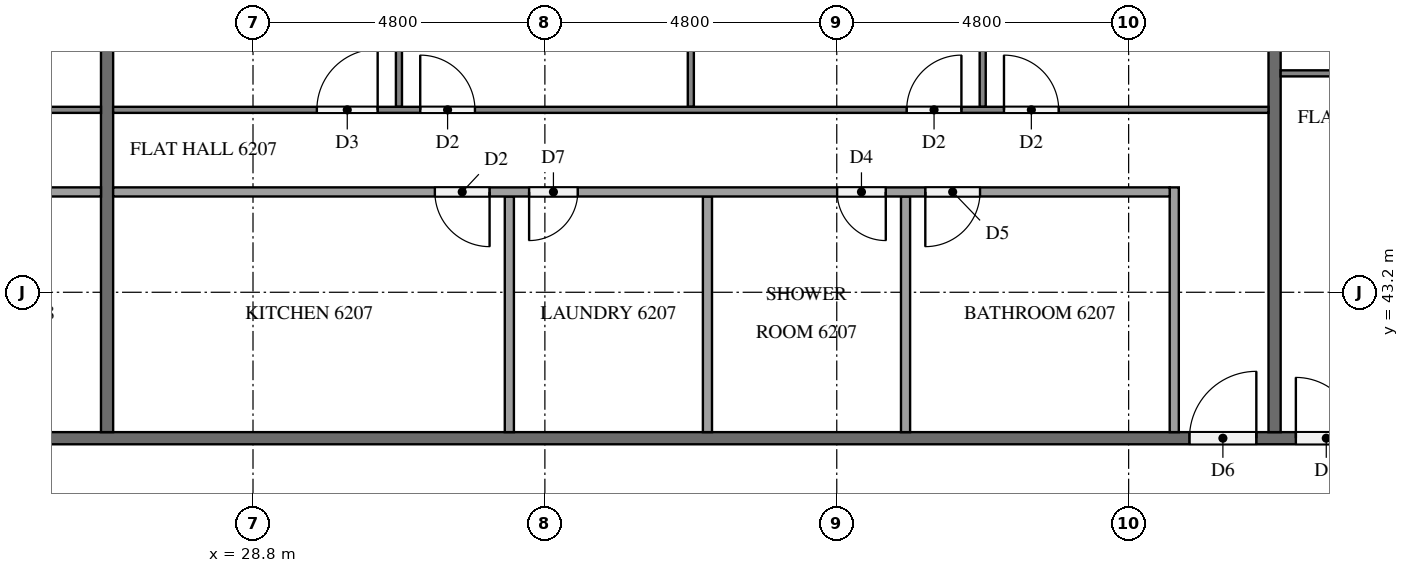
"""IFC4 building model, lengths in metres.
Left out: names, types, materials, properties, quantities, classifications, styles, units other than length and angle.
Written with IfcOpenShell. Run it as: python <this file> out.ifc"""

import sys

from ifc_helpers import new_model, si_unit, direction, frame, frame_2d, origin, place, context, subcontext, project, spatial, rectangle, extrude, element, fill, save


model = new_model("IFC4")
c1 = context("Model", 3, precision=1e-05, world=origin(), true_north=direction((0.0, 1.0)))
c2 = subcontext(c1, "Body", "Model", "MODEL_VIEW")
j1 = project(units=[si_unit("LENGTHUNIT", "METRE"), si_unit("PLANEANGLEUNIT", "RADIAN")], contexts=[c1])
p1 = place(None, origin())
s1 = spatial("IfcSite", under=j1, at=p1, CompositionType="ELEMENT")
p2 = place(p1, origin())
s2 = spatial("IfcBuilding", under=s1, at=p2, CompositionType="ELEMENT")
p3 = place(p2, frame((0.0, 0.0, 238.7)))
s3 = spatial("IfcBuildingStorey", under=s2, at=p3, CompositionType="ELEMENT", Elevation=238.7)
p4 = place(p3, frame((11.9, 40.8, 0.0), z_axis=(0.0, 0.0, 1.0), x_axis=(1.0, 0.0, 0.0)))
e1 = element("IfcWall", 1, at=p4, inside=s3, PredefinedType="PARTITIONING", context=c2, shape_type="SweptSolid", body=[
    extrude(rectangle(XDim=38.6, YDim=0.2, at=frame_2d((19.3, 0.0))), origin(), (0.0, 0.0, 1.0), 3.2),
])
p5 = place(p4, frame((34.05, 0.0, 0.0)))
e2 = element("IfcOpeningElement", 2, at=p5, cuts=e1, PredefinedType="OPENING", context=c2, shape_type="SweptSolid", body=[
    extrude(rectangle(XDim=1.0, YDim=2.1, at=frame_2d((0.5, 1.05))), frame((0.0, 0.11, 0.0), z_axis=(0.0, -1.0, 0.0), x_axis=(1.0, 0.0, 0.0)), (0.0, 0.0, 1.0), 0.22),
])
p6 = place(p4, frame((32.3, 0.0, 0.0)))
e3 = element("IfcOpeningElement", 3, at=p6, cuts=e1, PredefinedType="OPENING", context=c2, shape_type="SweptSolid", body=[
    extrude(rectangle(XDim=1.1, YDim=2.1, at=frame_2d((0.55, 1.05))), frame((0.0, 0.11, 0.0), z_axis=(0.0, -1.0, 0.0), x_axis=(1.0, 0.0, 0.0)), (0.0, 0.0, 1.0), 0.22),
])
p7 = place(p4, frame((2.85, 0.0, 0.0)))
e4 = element("IfcOpeningElement", 4, at=p7, cuts=e1, PredefinedType="OPENING", context=c2, shape_type="SweptSolid", body=[
    extrude(rectangle(XDim=1.0, YDim=2.1, at=frame_2d((0.5, 1.05))), frame((0.0, 0.11, 0.0), z_axis=(0.0, -1.0, 0.0), x_axis=(1.0, 0.0, 0.0)), (0.0, 0.0, 1.0), 0.22),
])
p8 = place(p4, frame((1.15, 0.0, 0.0)))
e5 = element("IfcOpeningElement", 5, at=p8, cuts=e1, PredefinedType="OPENING", context=c2, shape_type="SweptSolid", body=[
    extrude(rectangle(XDim=1.0, YDim=2.1, at=frame_2d((0.5, 1.05))), frame((0.0, 0.11, 0.0), z_axis=(0.0, -1.0, 0.0), x_axis=(1.0, 0.0, 0.0)), (0.0, 0.0, 1.0), 0.22),
])
for number, where, z_axis, x_axis in (
    (6, (45.6, 52.7, 0.0), (0.0, 0.0, 1.0), (0.0, -1.0, 0.0)),
    (7, (26.4, 52.7, 0.0), (0.0, 0.0, 1.0), (0.0, -1.0, 0.0)),
):
    element("IfcWall", number, at=place(p3, frame(where, z_axis=z_axis, x_axis=x_axis)), inside=s3, PredefinedType="PARTITIONING", context=c2, shape_type="SweptSolid", body=[
        extrude(rectangle(XDim=11.8, YDim=0.2, at=frame_2d((5.9, 0.0))), origin(), (0.0, 0.0, 1.0), 3.2),
    ])
p9 = place(p3, frame((45.7, 46.8, 0.0), z_axis=(0.0, 0.0, 1.0), x_axis=(1.0, 0.0, 0.0)))
e8 = element("IfcWall", 8, at=p9, inside=s3, PredefinedType="PARTITIONING", context=c2, shape_type="SweptSolid", body=[
    extrude(rectangle(XDim=11.8, YDim=0.1, at=frame_2d((5.9, 0.0))), origin(), (0.0, 0.0, 1.0), 3.2),
])
p10 = place(p9, frame((3.45, 0.0, 0.0)))
e9 = element("IfcOpeningElement", 9, at=p10, cuts=e8, PredefinedType="OPENING", context=c2, shape_type="SweptSolid", body=[
    extrude(rectangle(XDim=0.9, YDim=2.1, at=frame_2d((0.45, 1.05))), frame((0.0, 0.06, 0.0), z_axis=(0.0, -1.0, 0.0), x_axis=(1.0, 0.0, 0.0)), (0.0, 0.0, 1.0), 0.12),
])
p11 = place(p9, frame((5.05, 0.0, 0.0)))
e10 = element("IfcOpeningElement", 10, at=p11, cuts=e8, PredefinedType="OPENING", context=c2, shape_type="SweptSolid", body=[
    extrude(rectangle(XDim=1.0, YDim=2.1, at=frame_2d((0.5, 1.05))), frame((0.0, 0.06, 0.0), z_axis=(0.0, -1.0, 0.0), x_axis=(1.0, 0.0, 0.0)), (0.0, 0.0, 1.0), 0.12),
])
for number, where, z_axis, x_axis in (
    (11, (40.8, 46.25, 0.0), (0.0, 0.0, 1.0), (0.0, 1.0, 0.0)),
    (12, (36.0, 46.25, 0.0), (0.0, 0.0, 1.0), (0.0, 1.0, 0.0)),
    (13, (31.2, 46.25, 0.0), (0.0, 0.0, 1.0), (0.0, 1.0, 0.0)),
):
    element("IfcWall", number, at=place(p3, frame(where, z_axis=z_axis, x_axis=x_axis)), inside=s3, PredefinedType="PARTITIONING", context=c2, shape_type="SweptSolid", body=[
        extrude(rectangle(XDim=6.45, YDim=0.1, at=frame_2d((3.225, 0.0))), origin(), (0.0, 0.0, 1.0), 3.2),
    ])
p12 = place(p3, frame((26.5, 46.2, 0.0), z_axis=(0.0, 0.0, 1.0), x_axis=(1.0, 0.0, 0.0)))
e14 = element("IfcWall", 14, at=p12, inside=s3, PredefinedType="PARTITIONING", context=c2, shape_type="SweptSolid", body=[
    extrude(rectangle(XDim=19.0, YDim=0.1, at=frame_2d((9.5, 0.0))), origin(), (0.0, 0.0, 1.0), 3.2),
])
p13 = place(p12, frame((14.65, 0.0, 0.0)))
e15 = element("IfcOpeningElement", 15, at=p13, cuts=e14, PredefinedType="OPENING", context=c2, shape_type="SweptSolid", body=[
    extrude(rectangle(XDim=0.9, YDim=2.1, at=frame_2d((0.45, 1.05))), frame((0.0, 0.06, 0.0), z_axis=(0.0, -1.0, 0.0), x_axis=(1.0, 0.0, 0.0)), (0.0, 0.0, 1.0), 0.12),
])
p14 = place(p12, frame((13.05, 0.0, 0.0)))
e16 = element("IfcOpeningElement", 16, at=p14, cuts=e14, PredefinedType="OPENING", context=c2, shape_type="SweptSolid", body=[
    extrude(rectangle(XDim=0.9, YDim=2.1, at=frame_2d((0.45, 1.05))), frame((0.0, 0.06, 0.0), z_axis=(0.0, -1.0, 0.0), x_axis=(1.0, 0.0, 0.0)), (0.0, 0.0, 1.0), 0.12),
])
p15 = place(p12, frame((5.05, 0.0, 0.0)))
e17 = element("IfcOpeningElement", 17, at=p15, cuts=e14, PredefinedType="OPENING", context=c2, shape_type="SweptSolid", body=[
    extrude(rectangle(XDim=0.9, YDim=2.1, at=frame_2d((0.45, 1.05))), frame((0.0, 0.06, 0.0), z_axis=(0.0, -1.0, 0.0), x_axis=(1.0, 0.0, 0.0)), (0.0, 0.0, 1.0), 0.12),
])
p16 = place(p12, frame((3.35, 0.0, 0.0)))
e18 = element("IfcOpeningElement", 18, at=p16, cuts=e14, PredefinedType="OPENING", context=c2, shape_type="SweptSolid", body=[
    extrude(rectangle(XDim=1.0, YDim=2.1, at=frame_2d((0.5, 1.05))), frame((0.0, 0.06, 0.0), z_axis=(0.0, -1.0, 0.0), x_axis=(1.0, 0.0, 0.0)), (0.0, 0.0, 1.0), 0.12),
])
for number, where, z_axis, x_axis in (
    (19, (39.531, 40.9, 0.0), (0.0, 0.0, 1.0), (0.0, 1.0, 0.0)),
    (20, (36.273, 40.9, 0.0), (0.0, 0.0, 1.0), (0.0, 1.0, 0.0)),
    (21, (33.016, 40.9, 0.0), (0.0, 0.0, 1.0), (0.0, 1.0, 0.0)),
):
    element("IfcWall", number, at=place(p3, frame(where, z_axis=z_axis, x_axis=x_axis)), inside=s3, PredefinedType="PARTITIONING", context=c2, shape_type="SweptSolid", body=[
        extrude(rectangle(XDim=3.875, YDim=0.15, at=frame_2d((1.938, 0.0))), origin(), (0.0, 0.0, 1.0), 3.2),
    ])
p17 = place(p3, frame((43.95, 40.9, 0.0), z_axis=(0.0, 0.0, 1.0), x_axis=(0.0, 1.0, 0.0)))
e22 = element("IfcWall", 22, at=p17, inside=s3, PredefinedType="PARTITIONING", context=c2, shape_type="SweptSolid", body=[
    extrude(rectangle(XDim=4.025, YDim=0.15, at=frame_2d((2.013, 0.0))), origin(), (0.0, 0.0, 1.0), 3.2),
])
p18 = place(p3, frame((43.875, 44.85, 0.0), z_axis=(0.0, 0.0, 1.0), x_axis=(-1.0, 0.0, 0.0)))
e23 = element("IfcWall", 23, at=p18, inside=s3, PredefinedType="PARTITIONING", context=c2, shape_type="SweptSolid", body=[
    extrude(rectangle(XDim=17.375, YDim=0.15, at=frame_2d((8.688, 0.0))), origin(), (0.0, 0.0, 1.0), 3.2),
])
p19 = place(p18, frame((3.119, 0.0, 0.0)))
e24 = element("IfcOpeningElement", 24, at=p19, cuts=e23, PredefinedType="OPENING", context=c2, shape_type="SweptSolid", body=[
    extrude(rectangle(XDim=0.9, YDim=2.1, at=frame_2d((0.45, 1.05))), frame((0.0, 0.085, 0.0), z_axis=(0.0, -1.0, 0.0), x_axis=(1.0, 0.0, 0.0)), (0.0, 0.0, 1.0), 0.17),
])
p20 = place(p18, frame((4.669, 0.0, 0.0)))
e25 = element("IfcOpeningElement", 25, at=p20, cuts=e23, PredefinedType="OPENING", context=c2, shape_type="SweptSolid", body=[
    extrude(rectangle(XDim=0.8, YDim=2.1, at=frame_2d((0.4, 1.05))), frame((0.0, 0.085, 0.0), z_axis=(0.0, -1.0, 0.0), x_axis=(1.0, 0.0, 0.0)), (0.0, 0.0, 1.0), 0.17),
])
p21 = place(p18, frame((9.734, 0.0, 0.0)))
e26 = element("IfcOpeningElement", 26, at=p21, cuts=e23, PredefinedType="OPENING", context=c2, shape_type="SweptSolid", body=[
    extrude(rectangle(XDim=0.8, YDim=2.1, at=frame_2d((0.4, 1.05))), frame((0.0, 0.085, 0.0), z_axis=(0.0, -1.0, 0.0), x_axis=(1.0, 0.0, 0.0)), (0.0, 0.0, 1.0), 0.17),
])
p22 = place(p18, frame((11.184, 0.0, 0.0)))
e27 = element("IfcOpeningElement", 27, at=p22, cuts=e23, PredefinedType="OPENING", context=c2, shape_type="SweptSolid", body=[
    extrude(rectangle(XDim=0.9, YDim=2.1, at=frame_2d((0.45, 1.05))), frame((0.0, 0.085, 0.0), z_axis=(0.0, -1.0, 0.0), x_axis=(1.0, 0.0, 0.0)), (0.0, 0.0, 1.0), 0.17),
])
p23 = place(p3, frame((14.5, 46.2, 0.0), z_axis=(0.0, 0.0, 1.0), x_axis=(1.0, 0.0, 0.0)))
e28 = element("IfcWall", 28, at=p23, inside=s3, PredefinedType="PARTITIONING", context=c2, shape_type="SweptSolid", body=[
    extrude(rectangle(XDim=11.8, YDim=0.1, at=frame_2d((5.9, 0.0))), origin(), (0.0, 0.0, 1.0), 3.2),
])
p24 = place(p23, frame((3.45, 0.0, 0.0)))
e29 = element("IfcOpeningElement", 29, at=p24, cuts=e28, PredefinedType="OPENING", context=c2, shape_type="SweptSolid", body=[
    extrude(rectangle(XDim=0.9, YDim=2.1, at=frame_2d((0.45, 1.05))), frame((0.0, 0.06, 0.0), z_axis=(0.0, -1.0, 0.0), x_axis=(1.0, 0.0, 0.0)), (0.0, 0.0, 1.0), 0.12),
])
p25 = place(p23, frame((5.05, 0.0, 0.0)))
e30 = element("IfcOpeningElement", 30, at=p25, cuts=e28, PredefinedType="OPENING", context=c2, shape_type="SweptSolid", body=[
    extrude(rectangle(XDim=1.0, YDim=2.1, at=frame_2d((0.5, 1.05))), frame((0.0, 0.06, 0.0), z_axis=(0.0, -1.0, 0.0), x_axis=(1.0, 0.0, 0.0)), (0.0, 0.0, 1.0), 0.12),
])
p26 = place(p3, frame((26.3, 44.85, 0.0), z_axis=(0.0, 0.0, 1.0), x_axis=(-1.0, 0.0, 0.0)))
e31 = element("IfcWall", 31, at=p26, inside=s3, PredefinedType="PARTITIONING", context=c2, shape_type="SweptSolid", body=[
    extrude(rectangle(XDim=10.175, YDim=0.15, at=frame_2d((5.087, 0.0))), origin(), (0.0, 0.0, 1.0), 3.2),
])
p27 = place(p26, frame((4.395, 0.0, 0.0)))
e32 = element("IfcOpeningElement", 32, at=p27, cuts=e31, PredefinedType="OPENING", context=c2, shape_type="SweptSolid", body=[
    extrude(rectangle(XDim=0.9, YDim=2.1, at=frame_2d((0.45, 1.05))), frame((0.0, 0.085, 0.0), z_axis=(0.0, -1.0, 0.0), x_axis=(1.0, 0.0, 0.0)), (0.0, 0.0, 1.0), 0.17),
])
p28 = place(p26, frame((2.945, 0.0, 0.0)))
e33 = element("IfcOpeningElement", 33, at=p28, cuts=e31, PredefinedType="OPENING", context=c2, shape_type="SweptSolid", body=[
    extrude(rectangle(XDim=0.8, YDim=2.1, at=frame_2d((0.4, 1.05))), frame((0.0, 0.085, 0.0), z_axis=(0.0, -1.0, 0.0), x_axis=(1.0, 0.0, 0.0)), (0.0, 0.0, 1.0), 0.17),
])
p29 = place(p5, origin())
e34 = element("IfcDoor", 34, at=p29, inside=s3, OperationType="SINGLE_SWING_LEFT", PredefinedType="DOOR", context=c2, shape_type="SweptSolid", body=[
    extrude(rectangle(XDim=1.0, YDim=2.1, at=frame_2d((0.5, 1.05))), frame((0.0, 0.025, 0.0), z_axis=(0.0, -1.0, 0.0), x_axis=(1.0, 0.0, 0.0)), (0.0, 0.0, 1.0), 0.05),
])
fill(e2, e34)
p30 = place(p6, origin())
e35 = element("IfcDoor", 35, at=p30, inside=s3, OperationType="SINGLE_SWING_RIGHT", PredefinedType="DOOR", context=c2, shape_type="SweptSolid", body=[
    extrude(rectangle(XDim=1.1, YDim=2.1, at=frame_2d((0.55, 1.05))), frame((0.0, 0.025, 0.0), z_axis=(0.0, -1.0, 0.0), x_axis=(1.0, 0.0, 0.0)), (0.0, 0.0, 1.0), 0.05),
])
fill(e3, e35)
p31 = place(p13, origin())
e36 = element("IfcDoor", 36, at=p31, inside=s3, OperationType="SINGLE_SWING_LEFT", PredefinedType="DOOR", context=c2, shape_type="SweptSolid", body=[
    extrude(rectangle(XDim=0.9, YDim=2.1, at=frame_2d((0.45, 1.05))), frame((0.0, 0.025, 0.0), z_axis=(0.0, -1.0, 0.0), x_axis=(1.0, 0.0, 0.0)), (0.0, 0.0, 1.0), 0.05),
])
fill(e15, e36)
p32 = place(p14, origin())
e37 = element("IfcDoor", 37, at=p32, inside=s3, OperationType="SINGLE_SWING_RIGHT", PredefinedType="DOOR", context=c2, shape_type="SweptSolid", body=[
    extrude(rectangle(XDim=0.9, YDim=2.1, at=frame_2d((0.45, 1.05))), frame((0.0, 0.025, 0.0), z_axis=(0.0, -1.0, 0.0), x_axis=(1.0, 0.0, 0.0)), (0.0, 0.0, 1.0), 0.05),
])
fill(e16, e37)
p33 = place(p15, origin())
e38 = element("IfcDoor", 38, at=p33, inside=s3, OperationType="SINGLE_SWING_LEFT", PredefinedType="DOOR", context=c2, shape_type="SweptSolid", body=[
    extrude(rectangle(XDim=0.9, YDim=2.1, at=frame_2d((0.45, 1.05))), frame((0.0, 0.025, 0.0), z_axis=(0.0, -1.0, 0.0), x_axis=(1.0, 0.0, 0.0)), (0.0, 0.0, 1.0), 0.05),
])
fill(e17, e38)
p34 = place(p16, origin())
e39 = element("IfcDoor", 39, at=p34, inside=s3, OperationType="SINGLE_SWING_RIGHT", PredefinedType="DOOR", context=c2, shape_type="SweptSolid", body=[
    extrude(rectangle(XDim=1.0, YDim=2.1, at=frame_2d((0.5, 1.05))), frame((0.0, 0.025, 0.0), z_axis=(0.0, -1.0, 0.0), x_axis=(1.0, 0.0, 0.0)), (0.0, 0.0, 1.0), 0.05),
])
fill(e18, e39)
p35 = place(p19, origin())
e40 = element("IfcDoor", 40, at=p35, inside=s3, OperationType="SINGLE_SWING_RIGHT", PredefinedType="DOOR", context=c2, shape_type="SweptSolid", body=[
    extrude(rectangle(XDim=0.9, YDim=2.1, at=frame_2d((0.45, 1.05))), frame((0.0, 0.025, 0.0), z_axis=(0.0, -1.0, 0.0), x_axis=(1.0, 0.0, 0.0)), (0.0, 0.0, 1.0), 0.05),
])
fill(e24, e40)
p36 = place(p20, origin())
e41 = element("IfcDoor", 41, at=p36, inside=s3, OperationType="SINGLE_SWING_LEFT", PredefinedType="DOOR", context=c2, shape_type="SweptSolid", body=[
    extrude(rectangle(XDim=0.8, YDim=2.1, at=frame_2d((0.4, 1.05))), frame((0.0, 0.025, 0.0), z_axis=(0.0, -1.0, 0.0), x_axis=(1.0, 0.0, 0.0)), (0.0, 0.0, 1.0), 0.05),
])
fill(e25, e41)
p37 = place(p21, origin())
e42 = element("IfcDoor", 42, at=p37, inside=s3, OperationType="SINGLE_SWING_RIGHT", PredefinedType="DOOR", context=c2, shape_type="SweptSolid", body=[
    extrude(rectangle(XDim=0.8, YDim=2.1, at=frame_2d((0.4, 1.05))), frame((0.0, 0.025, 0.0), z_axis=(0.0, -1.0, 0.0), x_axis=(1.0, 0.0, 0.0)), (0.0, 0.0, 1.0), 0.05),
])
fill(e26, e42)
p38 = place(p22, origin())
e43 = element("IfcDoor", 43, at=p38, inside=s3, OperationType="SINGLE_SWING_LEFT", PredefinedType="DOOR", context=c2, shape_type="SweptSolid", body=[
    extrude(rectangle(XDim=0.9, YDim=2.1, at=frame_2d((0.45, 1.05))), frame((0.0, 0.025, 0.0), z_axis=(0.0, -1.0, 0.0), x_axis=(1.0, 0.0, 0.0)), (0.0, 0.0, 1.0), 0.05),
])
fill(e27, e43)
save(model, sys.argv[1])
